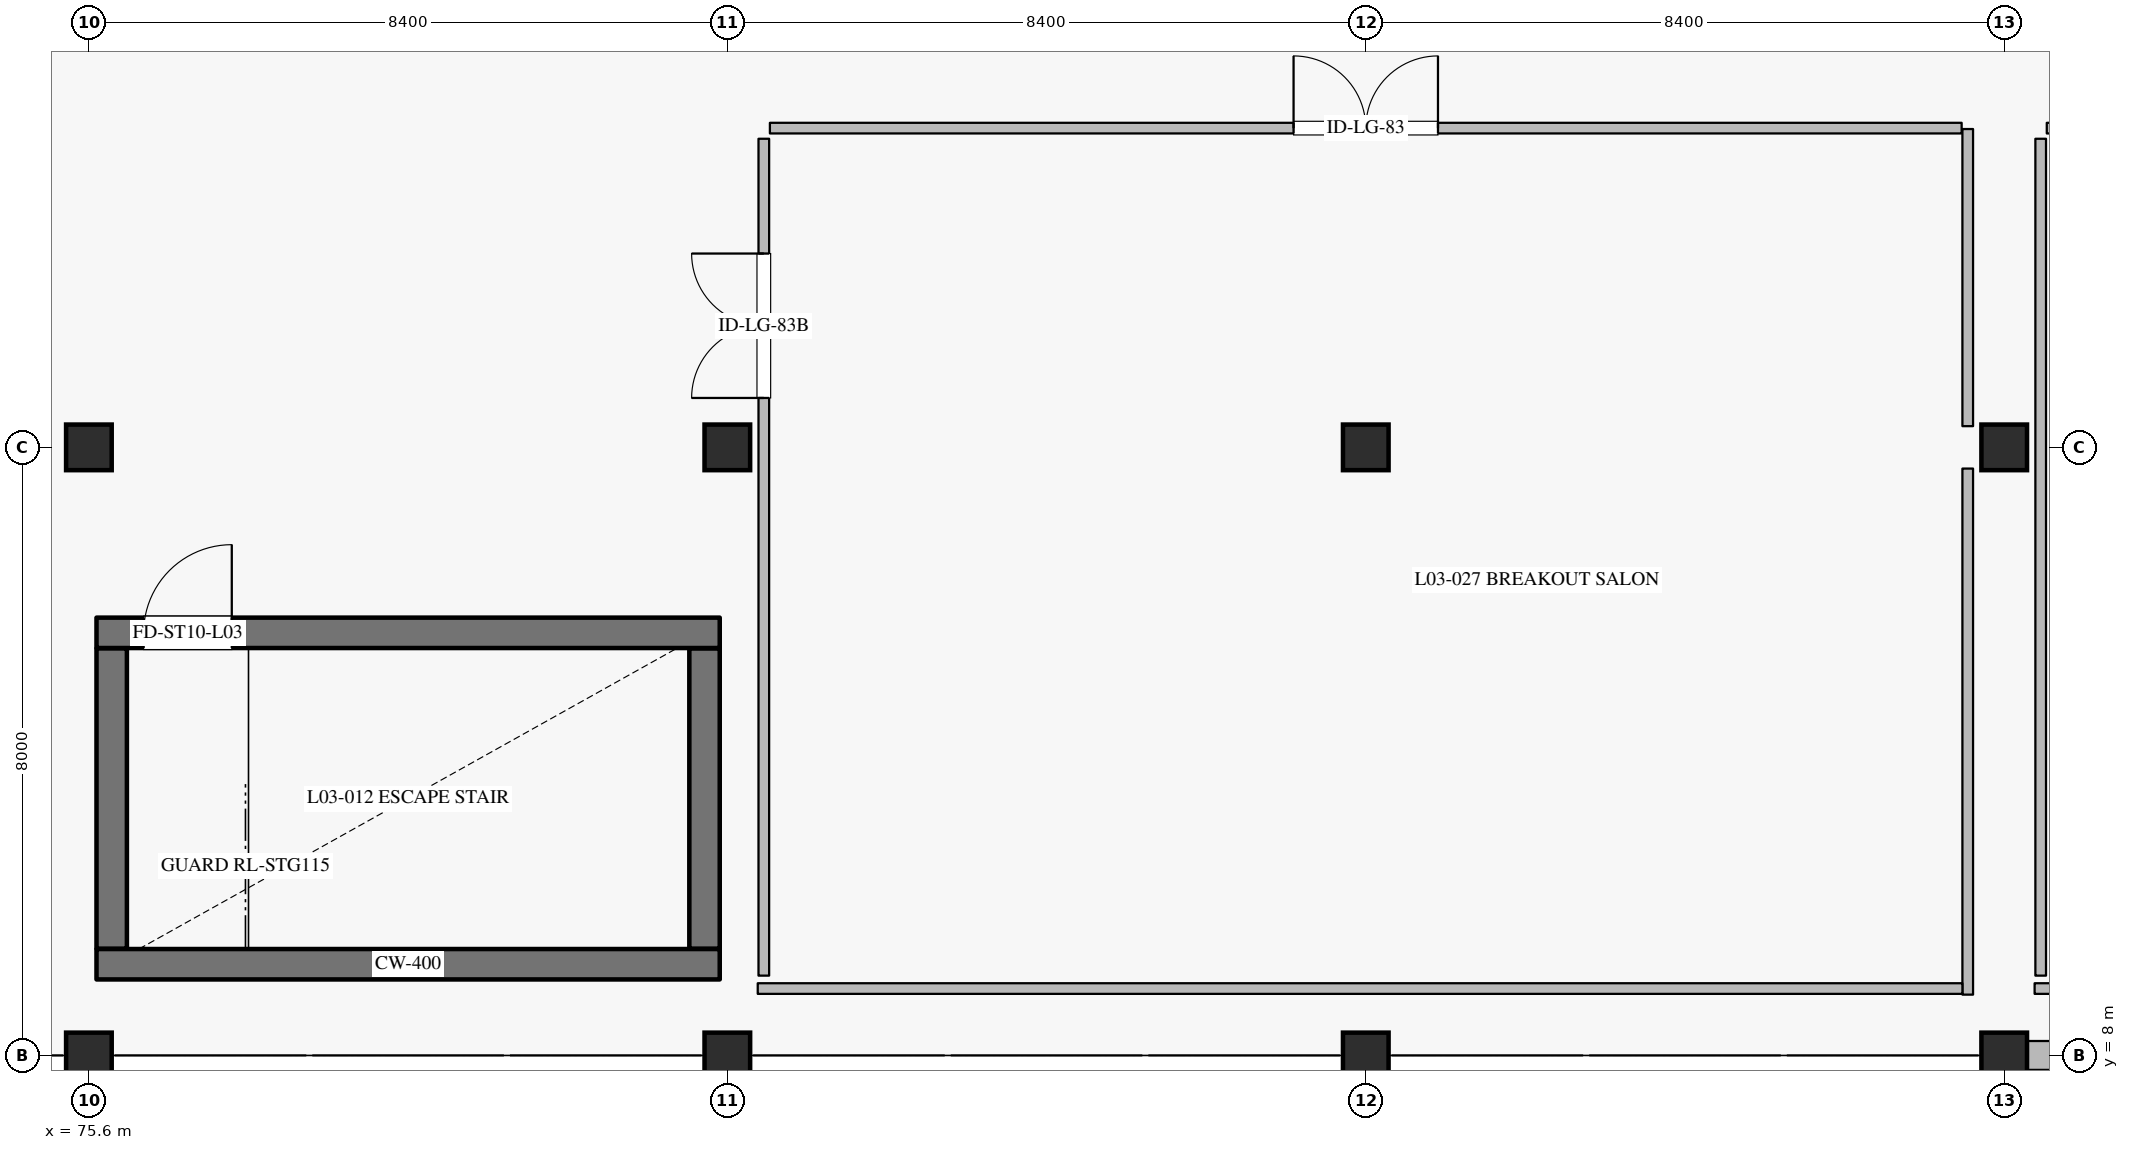
"""IFC4 building model, lengths in metres.
Left out: names, types, materials, properties, quantities, classifications, styles, units other than length and angle.
Written with IfcOpenShell. Run it as: python <this file> out.ifc"""

import sys

from ifc_helpers import new_model, si_unit, direction, frame, frame_2d, origin, origin_2d, place, context, subcontext, project, spatial, rectangle, extrude, element, fill, save


model = new_model("IFC4")
c1 = context("Model", 3, precision=1e-05, world=origin(), true_north=direction((0.0, 1.0)))
c2 = subcontext(c1, "Body", "Model", "MODEL_VIEW")
j1 = project(units=[si_unit("LENGTHUNIT", "METRE"), si_unit("PLANEANGLEUNIT", "RADIAN")], contexts=[c1])
p1 = place(None, origin())
s1 = spatial("IfcSite", under=j1, at=p1, CompositionType="ELEMENT")
p2 = place(p1, origin())
s2 = spatial("IfcBuilding", under=s1, at=p2, CompositionType="ELEMENT")
p3 = place(p2, frame((0.0, 0.0, 16.2)))
s3 = spatial("IfcBuildingStorey", under=s2, at=p3, CompositionType="ELEMENT", Elevation=16.2)
for number, where, z_axis, x_axis in (
    (1, (75.6, 8.0, 0.0), (0.0, 0.0, 1.0), (1.0, 0.0, 0.0)),
    (2, (75.6, 16.0, 0.0), (0.0, 0.0, 1.0), (1.0, 0.0, 0.0)),
    (3, (84.0, 8.0, 0.0), (0.0, 0.0, 1.0), (1.0, 0.0, 0.0)),
    (4, (84.0, 16.0, 0.0), (0.0, 0.0, 1.0), (1.0, 0.0, 0.0)),
    (5, (92.4, 8.0, 0.0), (0.0, 0.0, 1.0), (1.0, 0.0, 0.0)),
    (6, (92.4, 16.0, 0.0), (0.0, 0.0, 1.0), (1.0, 0.0, 0.0)),
    (7, (100.8, 8.0, 0.0), (0.0, 0.0, 1.0), (1.0, 0.0, 0.0)),
    (8, (100.8, 16.0, 0.0), (0.0, 0.0, 1.0), (1.0, 0.0, 0.0)),
):
    element("IfcColumn", number, at=place(p3, frame(where, z_axis=z_axis, x_axis=x_axis)), inside=s3, PredefinedType="COLUMN", context=c2, shape_type="SweptSolid", body=[
        extrude(rectangle(XDim=0.6, YDim=0.6, at=origin_2d()), origin(), (0.0, 0.0, 1.0), 4.8),
    ])
p4 = place(p3, frame((108.9, 8.0, 0.0), z_axis=(0.0, 0.0, 1.0), x_axis=(-1.0, 0.0, 0.0)))
e9 = element("IfcWall", 9, at=p4, inside=s3, PredefinedType="SOLIDWALL", context=c2, shape_type="SweptSolid", body=[
    extrude(rectangle(XDim=7.8, YDim=0.38, at=frame_2d((3.9, 0.0))), origin(), (0.0, 0.0, 1.0), 3.84),
])
p5 = place(p4, frame((2.7, 0.0, 0.95)))
e10 = element("IfcOpeningElement", 10, at=p5, cuts=e9, PredefinedType="OPENING", context=c2, shape_type="SweptSolid", body=[
    extrude(rectangle(XDim=2.4, YDim=1.65, at=frame_2d((1.2, 0.825))), frame((0.0, 0.2, 0.0), z_axis=(0.0, -1.0, 0.0), x_axis=(1.0, 0.0, 0.0)), (0.0, 0.0, 1.0), 0.4),
])
p6 = place(p3, frame((75.7, 9.2, 0.0), z_axis=(0.0, 0.0, 1.0), x_axis=(1.0, 0.0, 0.0)))
e11 = element("IfcWall", 11, at=p6, inside=s3, PredefinedType="SHEAR", context=c2, shape_type="SweptSolid", body=[
    extrude(rectangle(XDim=8.2, YDim=0.4, at=frame_2d((4.1, 0.0))), origin(), (0.0, 0.0, 1.0), 4.535),
])
p7 = place(p3, frame((83.7, 9.405, 0.0), z_axis=(0.0, 0.0, 1.0), x_axis=(0.0, 1.0, 0.0)))
e12 = element("IfcWall", 12, at=p7, inside=s3, PredefinedType="SHEAR", context=c2, shape_type="SweptSolid", body=[
    extrude(rectangle(XDim=3.95, YDim=0.4, at=frame_2d((1.975, 0.0))), origin(), (0.0, 0.0, 1.0), 4.535),
])
p8 = place(p3, frame((75.7, 13.56, 0.0), z_axis=(0.0, 0.0, 1.0), x_axis=(1.0, 0.0, 0.0)))
e13 = element("IfcWall", 13, at=p8, inside=s3, PredefinedType="SHEAR", context=c2, shape_type="SweptSolid", body=[
    extrude(rectangle(XDim=8.2, YDim=0.4, at=frame_2d((4.1, 0.0))), origin(), (0.0, 0.0, 1.0), 4.535),
])
p9 = place(p8, frame((0.62, 0.0, 0.0)))
e14 = element("IfcOpeningElement", 14, at=p9, cuts=e13, PredefinedType="OPENING", context=c2, shape_type="SweptSolid", body=[
    extrude(rectangle(XDim=1.16, YDim=2.2, at=frame_2d((0.58, 1.1))), frame((0.0, 0.21, 0.0), z_axis=(0.0, -1.0, 0.0), x_axis=(1.0, 0.0, 0.0)), (0.0, 0.0, 1.0), 0.42),
])
p10 = place(p3, frame((75.9, 9.405, 0.0), z_axis=(0.0, 0.0, 1.0), x_axis=(0.0, 1.0, 0.0)))
e15 = element("IfcWall", 15, at=p10, inside=s3, PredefinedType="SHEAR", context=c2, shape_type="SweptSolid", body=[
    extrude(rectangle(XDim=3.95, YDim=0.4, at=frame_2d((1.975, 0.0))), origin(), (0.0, 0.0, 1.0), 4.535),
])
p11 = place(p3, frame((84.56, 20.2, 0.0), z_axis=(0.0, 0.0, 1.0), x_axis=(1.0, 0.0, 0.0)))
e16 = element("IfcWall", 16, at=p11, inside=s3, PredefinedType="PARTITIONING", context=c2, shape_type="SweptSolid", body=[
    extrude(rectangle(XDim=15.68, YDim=0.14, at=frame_2d((7.84, 0.0))), origin(), (0.0, 0.0, 1.0), 4.535),
])
p12 = place(p11, frame((6.89, 0.0, 0.0)))
e17 = element("IfcOpeningElement", 17, at=p12, cuts=e16, PredefinedType="OPENING", context=c2, shape_type="SweptSolid", body=[
    extrude(rectangle(XDim=1.9, YDim=2.4, at=frame_2d((0.95, 1.2))), frame((0.0, 0.08, 0.0), z_axis=(0.0, -1.0, 0.0), x_axis=(1.0, 0.0, 0.0)), (0.0, 0.0, 1.0), 0.16),
])
p13 = place(p3, frame((84.48, 9.05, 0.0), z_axis=(0.0, 0.0, 1.0), x_axis=(0.0, 1.0, 0.0)))
e18 = element("IfcWall", 18, at=p13, inside=s3, PredefinedType="PARTITIONING", context=c2, shape_type="SweptSolid", body=[
    extrude(rectangle(XDim=11.01, YDim=0.14, at=frame_2d((5.505, 0.0))), origin(), (0.0, 0.0, 1.0), 4.535),
])
p14 = place(p13, frame((7.6, 0.0, 0.0)))
e19 = element("IfcOpeningElement", 19, at=p14, cuts=e18, PredefinedType="OPENING", context=c2, shape_type="SweptSolid", body=[
    extrude(rectangle(XDim=1.9, YDim=2.4, at=frame_2d((0.95, 1.2))), frame((0.0, 0.08, 0.0), z_axis=(0.0, -1.0, 0.0), x_axis=(1.0, 0.0, 0.0)), (0.0, 0.0, 1.0), 0.16),
])
p15 = place(p3, frame((101.36, 20.2, 0.0), z_axis=(0.0, 0.0, 1.0), x_axis=(1.0, 0.0, 0.0)))
e20 = element("IfcWall", 20, at=p15, inside=s3, PredefinedType="PARTITIONING", context=c2, shape_type="SweptSolid", body=[
    extrude(rectangle(XDim=15.28, YDim=0.14, at=frame_2d((7.64, 0.0))), origin(), (0.0, 0.0, 1.0), 4.535),
])
p16 = place(p15, frame((2.9, 0.0, 0.0)))
e21 = element("IfcOpeningElement", 21, at=p16, cuts=e20, PredefinedType="OPENING", context=c2, shape_type="SweptSolid", body=[
    extrude(rectangle(XDim=1.9, YDim=2.4, at=frame_2d((0.95, 1.2))), frame((0.0, 0.08, 0.0), z_axis=(0.0, -1.0, 0.0), x_axis=(1.0, 0.0, 0.0)), (0.0, 0.0, 1.0), 0.16),
])
p17 = place(p15, frame((10.5, 0.0, 0.0)))
e22 = element("IfcOpeningElement", 22, at=p17, cuts=e20, PredefinedType="OPENING", context=c2, shape_type="SweptSolid", body=[
    extrude(rectangle(XDim=1.9, YDim=2.4, at=frame_2d((0.95, 1.2))), frame((0.0, 0.08, 0.0), z_axis=(0.0, -1.0, 0.0), x_axis=(1.0, 0.0, 0.0)), (0.0, 0.0, 1.0), 0.16),
])
p18 = place(p3, frame((101.28, 9.05, 0.0), z_axis=(0.0, 0.0, 1.0), x_axis=(0.0, 1.0, 0.0)))
e23 = element("IfcWall", 23, at=p18, inside=s3, PredefinedType="PARTITIONING", context=c2, shape_type="SweptSolid", body=[
    extrude(rectangle(XDim=11.01, YDim=0.14, at=frame_2d((5.505, 0.0))), origin(), (0.0, 0.0, 1.0), 4.535),
])
p19 = place(p3, frame((100.32, 8.8, 0.0), z_axis=(0.0, 0.0, 1.0), x_axis=(0.0, 1.0, 0.0)))
e24 = element("IfcWall", 24, at=p19, inside=s3, PredefinedType="PARTITIONING", context=c2, shape_type="SweptSolid", body=[
    extrude(rectangle(XDim=6.921, YDim=0.14, at=frame_2d((3.46, 0.0))), origin(), (0.0, 0.0, 1.0), 4.535),
])
p20 = place(p3, frame((100.32, 16.279, 0.0), z_axis=(0.0, 0.0, 1.0), x_axis=(0.0, 1.0, 0.0)))
e25 = element("IfcWall", 25, at=p20, inside=s3, PredefinedType="PARTITIONING", context=c2, shape_type="SweptSolid", body=[
    extrude(rectangle(XDim=3.909, YDim=0.14, at=frame_2d((1.955, 0.0))), origin(), (0.0, 0.0, 1.0), 4.535),
])
p21 = place(p3, frame((84.4, 8.88, 0.0), z_axis=(0.0, 0.0, 1.0), x_axis=(1.0, 0.0, 0.0)))
e26 = element("IfcWall", 26, at=p21, inside=s3, PredefinedType="PARTITIONING", context=c2, shape_type="SweptSolid", body=[
    extrude(rectangle(XDim=15.85, YDim=0.14, at=frame_2d((7.925, 0.0))), origin(), (0.0, 0.0, 1.0), 4.535),
])
p22 = place(p3, frame((101.2, 8.88, 0.0), z_axis=(0.0, 0.0, 1.0), x_axis=(1.0, 0.0, 0.0)))
e27 = element("IfcWall", 27, at=p22, inside=s3, PredefinedType="PARTITIONING", context=c2, shape_type="SweptSolid", body=[
    extrude(rectangle(XDim=15.45, YDim=0.14, at=frame_2d((7.725, 0.0))), origin(), (0.0, 0.0, 1.0), 4.535),
])
p23 = place(p9, origin())
e28 = element("IfcDoor", 28, at=p23, inside=s3, OperationType="SINGLE_SWING_RIGHT", PredefinedType="DOOR", context=c2, shape_type="SweptSolid", body=[
    extrude(rectangle(XDim=1.16, YDim=2.2, at=frame_2d((0.58, 1.1))), frame((0.0, 0.025, 0.0), z_axis=(0.0, -1.0, 0.0), x_axis=(1.0, 0.0, 0.0)), (0.0, 0.0, 1.0), 0.05),
])
fill(e14, e28)
p24 = place(p12, origin())
e29 = element("IfcDoor", 29, at=p24, inside=s3, OperationType="DOUBLE_DOOR_SINGLE_SWING", PredefinedType="DOOR", context=c2, shape_type="SweptSolid", body=[
    extrude(rectangle(XDim=1.9, YDim=2.4, at=frame_2d((0.95, 1.2))), frame((0.0, 0.025, 0.0), z_axis=(0.0, -1.0, 0.0), x_axis=(1.0, 0.0, 0.0)), (0.0, 0.0, 1.0), 0.05),
])
fill(e17, e29)
p25 = place(p14, origin())
e30 = element("IfcDoor", 30, at=p25, inside=s3, OperationType="DOUBLE_DOOR_SINGLE_SWING", PredefinedType="DOOR", context=c2, shape_type="SweptSolid", body=[
    extrude(rectangle(XDim=1.9, YDim=2.4, at=frame_2d((0.95, 1.2))), frame((0.0, 0.025, 0.0), z_axis=(0.0, -1.0, 0.0), x_axis=(1.0, 0.0, 0.0)), (0.0, 0.0, 1.0), 0.05),
])
fill(e19, e30)
save(model, sys.argv[1])
